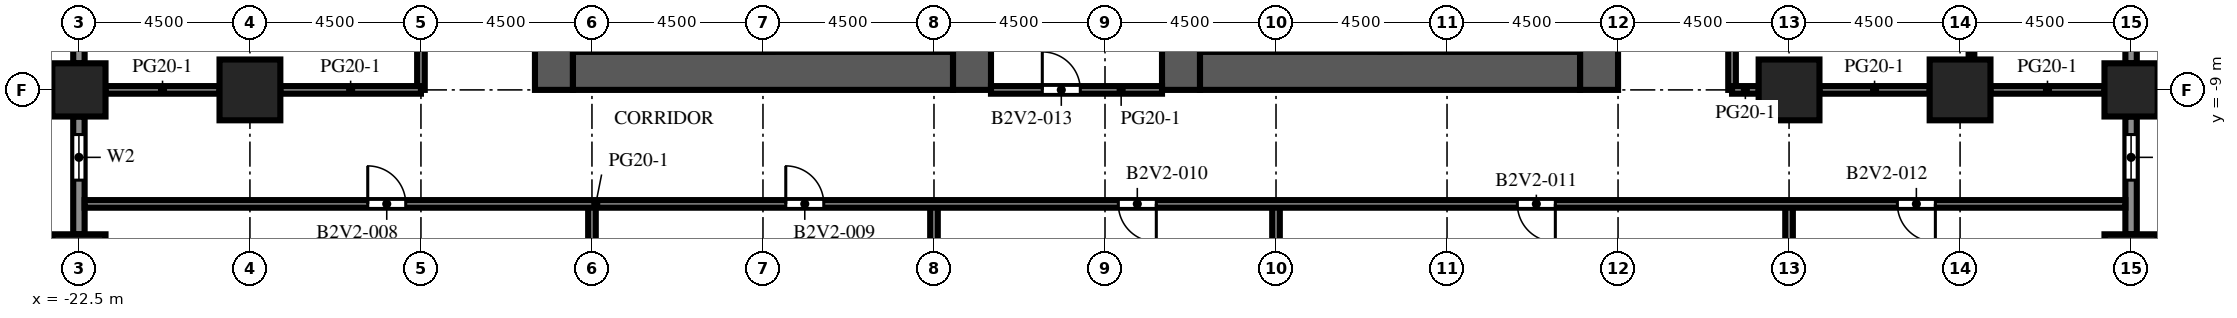
"""IFC4 building model, lengths in metres.
Left out: names, types, materials, properties, quantities, classifications, styles, units other than length and angle.
Written with IfcOpenShell. Run it as: python <this file> out.ifc"""

import sys

from ifc_helpers import new_model, si_unit, direction, frame, frame_2d, origin, origin_2d, place, context, subcontext, project, spatial, rectangle, extrude, element, fill, save


model = new_model("IFC4")
c1 = context("Model", 3, precision=1e-05, world=origin(), true_north=direction((0.0, 1.0)))
c2 = subcontext(c1, "Body", "Model", "MODEL_VIEW")
j1 = project(units=[si_unit("LENGTHUNIT", "METRE"), si_unit("PLANEANGLEUNIT", "RADIAN")], contexts=[c1])
p1 = place(None, origin())
s1 = spatial("IfcSite", under=j1, at=p1, CompositionType="ELEMENT")
p2 = place(p1, origin())
s2 = spatial("IfcBuilding", under=s1, at=p2, CompositionType="ELEMENT")
p3 = place(p2, frame((0.0, 0.0, 58.3)))
s3 = spatial("IfcBuildingStorey", under=s2, at=p3, CompositionType="ELEMENT", Elevation=58.3)
for number, where, z_axis, x_axis in (
    (1, (-22.5, -13.5, 0.0), (0.0, 0.0, 1.0), (1.0, 0.0, 0.0)),
    (2, (-22.5, -9.0, 0.0), (0.0, 0.0, 1.0), (1.0, 0.0, 0.0)),
    (3, (31.5, -13.5, 0.0), (0.0, 0.0, 1.0), (1.0, 0.0, 0.0)),
    (4, (31.5, -9.0, 0.0), (0.0, 0.0, 1.0), (1.0, 0.0, 0.0)),
):
    element("IfcColumn", number, at=place(p3, frame(where, z_axis=z_axis, x_axis=x_axis)), inside=s3, PredefinedType="COLUMN", context=c2, shape_type="SweptSolid", body=[
        extrude(rectangle(XDim=1.4, YDim=1.4, at=origin_2d()), origin(), (0.0, 0.0, 1.0), 4.1),
    ])
for number, where, z_axis, x_axis in (
    (5, (-18.0, -9.0, 0.0), (0.0, 0.0, 1.0), (1.0, 0.0, 0.0)),
    (6, (22.5, -9.0, 0.0), (0.0, 0.0, 1.0), (1.0, 0.0, 0.0)),
    (7, (27.0, -9.0, 0.0), (0.0, 0.0, 1.0), (1.0, 0.0, 0.0)),
):
    element("IfcColumn", number, at=place(p3, frame(where, z_axis=z_axis, x_axis=x_axis)), inside=s3, PredefinedType="COLUMN", context=c2, shape_type="SweptSolid", body=[
        extrude(rectangle(XDim=1.6, YDim=1.6, at=origin_2d()), origin(), (0.0, 0.0, 1.0), 4.1),
    ])
p4 = place(p3, frame((-10.0, -9.0, 0.0), z_axis=(0.0, 0.0, 1.0), x_axis=(0.0, 1.0, 0.0)))
e8 = element("IfcWall", 8, at=p4, inside=s3, PredefinedType="SHEAR", context=c2, shape_type="SweptSolid", body=[
    extrude(rectangle(XDim=27.5, YDim=1.0, at=frame_2d((13.75, 0.0))), origin(), (0.0, 0.0, 1.0), 4.1),
])
p5 = place(p4, frame((12.55, 0.0, 0.0)))
e9 = element("IfcOpeningElement", 9, at=p5, cuts=e8, PredefinedType="OPENING", context=c2, shape_type="SweptSolid", body=[
    extrude(rectangle(XDim=2.4, YDim=2.4, at=frame_2d((1.2, 1.2))), frame((0.0, 0.51, 0.0), z_axis=(0.0, -1.0, 0.0), x_axis=(1.0, 0.0, 0.0)), (0.0, 0.0, 1.0), 1.02),
])
p6 = place(p4, frame((6.825, 0.0, 0.0)))
e10 = element("IfcOpeningElement", 10, at=p6, cuts=e8, PredefinedType="OPENING", context=c2, shape_type="SweptSolid", body=[
    extrude(rectangle(XDim=1.2, YDim=2.1, at=frame_2d((0.6, 1.05))), frame((0.0, 0.51, 0.0), z_axis=(0.0, -1.0, 0.0), x_axis=(1.0, 0.0, 0.0)), (0.0, 0.0, 1.0), 1.02),
])
p7 = place(p4, frame((19.475, 0.0, 0.0)))
e11 = element("IfcOpeningElement", 11, at=p7, cuts=e8, PredefinedType="OPENING", context=c2, shape_type="SweptSolid", body=[
    extrude(rectangle(XDim=1.2, YDim=2.1, at=frame_2d((0.6, 1.05))), frame((0.0, 0.51, 0.0), z_axis=(0.0, -1.0, 0.0), x_axis=(1.0, 0.0, 0.0)), (0.0, 0.0, 1.0), 1.02),
])
p8 = place(p3, frame((1.0, -9.0, 0.0), z_axis=(0.0, 0.0, 1.0), x_axis=(0.0, 1.0, 0.0)))
e12 = element("IfcWall", 12, at=p8, inside=s3, PredefinedType="SHEAR", context=c2, shape_type="SweptSolid", body=[
    extrude(rectangle(XDim=27.5, YDim=1.0, at=frame_2d((13.75, 0.0))), origin(), (0.0, 0.0, 1.0), 4.1),
])
p9 = place(p8, frame((12.55, 0.0, 0.0)))
e13 = element("IfcOpeningElement", 13, at=p9, cuts=e12, PredefinedType="OPENING", context=c2, shape_type="SweptSolid", body=[
    extrude(rectangle(XDim=2.4, YDim=2.4, at=frame_2d((1.2, 1.2))), frame((0.0, 0.51, 0.0), z_axis=(0.0, -1.0, 0.0), x_axis=(1.0, 0.0, 0.0)), (0.0, 0.0, 1.0), 1.02),
])
p10 = place(p8, frame((5.55, 0.0, 0.0)))
e14 = element("IfcOpeningElement", 14, at=p10, cuts=e12, PredefinedType="OPENING", context=c2, shape_type="SweptSolid", body=[
    extrude(rectangle(XDim=0.905, YDim=2.1, at=frame_2d((0.453, 1.05))), frame((0.0, 0.51, 0.0), z_axis=(0.0, -1.0, 0.0), x_axis=(1.0, 0.0, 0.0)), (0.0, 0.0, 1.0), 1.02),
])
p11 = place(p8, frame((23.363, 0.0, 0.0)))
e15 = element("IfcOpeningElement", 15, at=p11, cuts=e12, PredefinedType="OPENING", context=c2, shape_type="SweptSolid", body=[
    extrude(rectangle(XDim=1.2, YDim=2.1, at=frame_2d((0.6, 1.05))), frame((0.0, 0.51, 0.0), z_axis=(0.0, -1.0, 0.0), x_axis=(1.0, 0.0, 0.0)), (0.0, 0.0, 1.0), 1.02),
])
p12 = place(p3, frame((-9.5, -8.5, 0.0), z_axis=(0.0, 0.0, 1.0), x_axis=(1.0, 0.0, 0.0)))
e16 = element("IfcWall", 16, at=p12, inside=s3, PredefinedType="SHEAR", context=c2, shape_type="SweptSolid", body=[
    extrude(rectangle(XDim=10.0, YDim=1.0, at=frame_2d((5.0, 0.0))), origin(), (0.0, 0.0, 1.0), 4.1),
])
p13 = place(p3, frame((6.5, -9.0, 0.0), z_axis=(0.0, 0.0, 1.0), x_axis=(0.0, 1.0, 0.0)))
e17 = element("IfcWall", 17, at=p13, inside=s3, PredefinedType="SHEAR", context=c2, shape_type="SweptSolid", body=[
    extrude(rectangle(XDim=27.5, YDim=1.0, at=frame_2d((13.75, 0.0))), origin(), (0.0, 0.0, 1.0), 4.1),
])
p14 = place(p13, frame((12.55, 0.0, 0.0)))
e18 = element("IfcOpeningElement", 18, at=p14, cuts=e17, PredefinedType="OPENING", context=c2, shape_type="SweptSolid", body=[
    extrude(rectangle(XDim=2.4, YDim=2.4, at=frame_2d((1.2, 1.2))), frame((0.0, 0.51, 0.0), z_axis=(0.0, -1.0, 0.0), x_axis=(1.0, 0.0, 0.0)), (0.0, 0.0, 1.0), 1.02),
])
p15 = place(p13, frame((5.55, 0.0, 0.0)))
e19 = element("IfcOpeningElement", 19, at=p15, cuts=e17, PredefinedType="OPENING", context=c2, shape_type="SweptSolid", body=[
    extrude(rectangle(XDim=0.905, YDim=2.1, at=frame_2d((0.453, 1.05))), frame((0.0, 0.51, 0.0), z_axis=(0.0, -1.0, 0.0), x_axis=(1.0, 0.0, 0.0)), (0.0, 0.0, 1.0), 1.02),
])
p16 = place(p13, frame((23.363, 0.0, 0.0)))
e20 = element("IfcOpeningElement", 20, at=p16, cuts=e17, PredefinedType="OPENING", context=c2, shape_type="SweptSolid", body=[
    extrude(rectangle(XDim=1.2, YDim=2.1, at=frame_2d((0.6, 1.05))), frame((0.0, 0.51, 0.0), z_axis=(0.0, -1.0, 0.0), x_axis=(1.0, 0.0, 0.0)), (0.0, 0.0, 1.0), 1.02),
])
p17 = place(p3, frame((17.5, -9.0, 0.0), z_axis=(0.0, 0.0, 1.0), x_axis=(0.0, 1.0, 0.0)))
e21 = element("IfcWall", 21, at=p17, inside=s3, PredefinedType="SHEAR", context=c2, shape_type="SweptSolid", body=[
    extrude(rectangle(XDim=27.5, YDim=1.0, at=frame_2d((13.75, 0.0))), origin(), (0.0, 0.0, 1.0), 4.1),
])
p18 = place(p17, frame((12.55, 0.0, 0.0)))
e22 = element("IfcOpeningElement", 22, at=p18, cuts=e21, PredefinedType="OPENING", context=c2, shape_type="SweptSolid", body=[
    extrude(rectangle(XDim=2.4, YDim=2.4, at=frame_2d((1.2, 1.2))), frame((0.0, 0.51, 0.0), z_axis=(0.0, -1.0, 0.0), x_axis=(1.0, 0.0, 0.0)), (0.0, 0.0, 1.0), 1.02),
])
p19 = place(p17, frame((6.825, 0.0, 0.0)))
e23 = element("IfcOpeningElement", 23, at=p19, cuts=e21, PredefinedType="OPENING", context=c2, shape_type="SweptSolid", body=[
    extrude(rectangle(XDim=1.2, YDim=2.1, at=frame_2d((0.6, 1.05))), frame((0.0, 0.51, 0.0), z_axis=(0.0, -1.0, 0.0), x_axis=(1.0, 0.0, 0.0)), (0.0, 0.0, 1.0), 1.02),
])
p20 = place(p17, frame((19.475, 0.0, 0.0)))
e24 = element("IfcOpeningElement", 24, at=p20, cuts=e21, PredefinedType="OPENING", context=c2, shape_type="SweptSolid", body=[
    extrude(rectangle(XDim=1.2, YDim=2.1, at=frame_2d((0.6, 1.05))), frame((0.0, 0.51, 0.0), z_axis=(0.0, -1.0, 0.0), x_axis=(1.0, 0.0, 0.0)), (0.0, 0.0, 1.0), 1.02),
])
p21 = place(p3, frame((7.0, -8.5, 0.0), z_axis=(0.0, 0.0, 1.0), x_axis=(1.0, 0.0, 0.0)))
e25 = element("IfcWall", 25, at=p21, inside=s3, PredefinedType="SHEAR", context=c2, shape_type="SweptSolid", body=[
    extrude(rectangle(XDim=10.0, YDim=1.0, at=frame_2d((5.0, 0.0))), origin(), (0.0, 0.0, 1.0), 4.1),
])
p22 = place(p3, frame((31.5, -9.7, 0.0), z_axis=(0.0, 0.0, 1.0), x_axis=(0.0, -1.0, 0.0)))
e26 = element("IfcWall", 26, at=p22, inside=s3, PredefinedType="SOLIDWALL", context=c2, shape_type="SweptSolid", body=[
    extrude(rectangle(XDim=3.1, YDim=0.3, at=frame_2d((1.55, 0.0))), origin(), (0.0, 0.0, 1.0), 2.75),
])
p23 = place(p22, frame((0.475, 0.0, 0.8)))
e27 = element("IfcOpeningElement", 27, at=p23, cuts=e26, PredefinedType="OPENING", context=c2, shape_type="SweptSolid", body=[
    extrude(rectangle(XDim=1.2, YDim=1.7, at=frame_2d((0.6, 0.85))), frame((0.0, 0.16, 0.0), z_axis=(0.0, -1.0, 0.0), x_axis=(1.0, 0.0, 0.0)), (0.0, 0.0, 1.0), 0.32),
])
p24 = place(p3, frame((31.5, -5.2, 0.0), z_axis=(0.0, 0.0, 1.0), x_axis=(0.0, -1.0, 0.0)))
e28 = element("IfcWall", 28, at=p24, inside=s3, PredefinedType="SOLIDWALL", context=c2, shape_type="SweptSolid", body=[
    extrude(rectangle(XDim=3.1, YDim=0.3, at=frame_2d((1.55, 0.0))), origin(), (0.0, 0.0, 1.0), 2.75),
])
p25 = place(p24, frame((0.35, 0.0, 0.8)))
e29 = element("IfcOpeningElement", 29, at=p25, cuts=e28, PredefinedType="OPENING", context=c2, shape_type="SweptSolid", body=[
    extrude(rectangle(XDim=2.4, YDim=1.7, at=frame_2d((1.2, 0.85))), frame((0.0, 0.16, 0.0), z_axis=(0.0, -1.0, 0.0), x_axis=(1.0, 0.0, 0.0)), (0.0, 0.0, 1.0), 0.32),
])
p26 = place(p3, frame((-22.5, -8.3, 0.0), z_axis=(0.0, 0.0, 1.0), x_axis=(0.0, 1.0, 0.0)))
e30 = element("IfcWall", 30, at=p26, inside=s3, PredefinedType="SOLIDWALL", context=c2, shape_type="SweptSolid", body=[
    extrude(rectangle(XDim=3.1, YDim=0.3, at=frame_2d((1.55, 0.0))), origin(), (0.0, 0.0, 1.0), 2.75),
])
p27 = place(p26, frame((0.35, 0.0, 0.8)))
e31 = element("IfcOpeningElement", 31, at=p27, cuts=e30, PredefinedType="OPENING", context=c2, shape_type="SweptSolid", body=[
    extrude(rectangle(XDim=2.4, YDim=1.7, at=frame_2d((1.2, 0.85))), frame((0.0, 0.16, 0.0), z_axis=(0.0, -1.0, 0.0), x_axis=(1.0, 0.0, 0.0)), (0.0, 0.0, 1.0), 0.32),
])
p28 = place(p3, frame((-22.5, -12.8, 0.0), z_axis=(0.0, 0.0, 1.0), x_axis=(0.0, 1.0, 0.0)))
e32 = element("IfcWall", 32, at=p28, inside=s3, PredefinedType="SOLIDWALL", context=c2, shape_type="SweptSolid", body=[
    extrude(rectangle(XDim=3.1, YDim=0.3, at=frame_2d((1.55, 0.0))), origin(), (0.0, 0.0, 1.0), 2.75),
])
p29 = place(p28, frame((1.425, 0.0, 0.8)))
e33 = element("IfcOpeningElement", 33, at=p29, cuts=e32, PredefinedType="OPENING", context=c2, shape_type="SweptSolid", body=[
    extrude(rectangle(XDim=1.2, YDim=1.7, at=frame_2d((0.6, 0.85))), frame((0.0, 0.16, 0.0), z_axis=(0.0, -1.0, 0.0), x_axis=(1.0, 0.0, 0.0)), (0.0, 0.0, 1.0), 0.32),
])
p30 = place(p3, frame((-13.5, -9.0, 0.0), z_axis=(0.0, 0.0, 1.0), x_axis=(0.0, 1.0, 0.0)))
e34 = element("IfcWall", 34, at=p30, inside=s3, PredefinedType="PARTITIONING", context=c2, shape_type="SweptSolid", body=[
    extrude(rectangle(XDim=27.5, YDim=0.2, at=frame_2d((13.75, 0.0))), origin(), (0.0, 0.0, 1.0), 3.65),
])
p31 = place(p30, frame((4.85, 0.0, 0.0)))
e35 = element("IfcOpeningElement", 35, at=p31, cuts=e34, PredefinedType="OPENING", context=c2, shape_type="SweptSolid", body=[
    extrude(rectangle(XDim=1.0, YDim=2.1, at=frame_2d((0.5, 1.05))), frame((0.0, 0.11, 0.0), z_axis=(0.0, -1.0, 0.0), x_axis=(1.0, 0.0, 0.0)), (0.0, 0.0, 1.0), 0.22),
])
p32 = place(p30, frame((16.35, 0.0, 0.0)))
e36 = element("IfcOpeningElement", 36, at=p32, cuts=e34, PredefinedType="OPENING", context=c2, shape_type="SweptSolid", body=[
    extrude(rectangle(XDim=1.0, YDim=2.1, at=frame_2d((0.5, 1.05))), frame((0.0, 0.11, 0.0), z_axis=(0.0, -1.0, 0.0), x_axis=(1.0, 0.0, 0.0)), (0.0, 0.0, 1.0), 0.22),
])
for number, where, z_axis, x_axis in (
    (37, (-9.0, -17.2, 0.0), (0.0, 0.0, 1.0), (0.0, 1.0, 0.0)),
    (38, (0.0, -17.2, 0.0), (0.0, 0.0, 1.0), (0.0, 1.0, 0.0)),
    (39, (9.0, -17.2, 0.0), (0.0, 0.0, 1.0), (0.0, 1.0, 0.0)),
):
    element("IfcWall", number, at=place(p3, frame(where, z_axis=z_axis, x_axis=x_axis)), inside=s3, PredefinedType="PARTITIONING", context=c2, shape_type="SweptSolid", body=[
        extrude(rectangle(XDim=5.2, YDim=0.2, at=frame_2d((2.6, 0.0))), origin(), (0.0, 0.0, 1.0), 3.65),
    ])
p33 = place(p3, frame((21.0, 18.5, 0.0), z_axis=(0.0, 0.0, 1.0), x_axis=(0.0, -1.0, 0.0)))
e40 = element("IfcWall", 40, at=p33, inside=s3, PredefinedType="PARTITIONING", context=c2, shape_type="SweptSolid", body=[
    extrude(rectangle(XDim=27.5, YDim=0.2, at=frame_2d((13.75, 0.0))), origin(), (0.0, 0.0, 1.0), 3.65),
])
p34 = place(p33, frame((19.4, 0.0, 0.0)))
e41 = element("IfcOpeningElement", 41, at=p34, cuts=e40, PredefinedType="OPENING", context=c2, shape_type="SweptSolid", body=[
    extrude(rectangle(XDim=1.0, YDim=2.1, at=frame_2d((0.5, 1.05))), frame((0.0, 0.11, 0.0), z_axis=(0.0, -1.0, 0.0), x_axis=(1.0, 0.0, 0.0)), (0.0, 0.0, 1.0), 0.22),
])
p35 = place(p33, frame((7.65, 0.0, 0.0)))
e42 = element("IfcOpeningElement", 42, at=p35, cuts=e40, PredefinedType="OPENING", context=c2, shape_type="SweptSolid", body=[
    extrude(rectangle(XDim=1.0, YDim=2.1, at=frame_2d((0.5, 1.05))), frame((0.0, 0.11, 0.0), z_axis=(0.0, -1.0, 0.0), x_axis=(1.0, 0.0, 0.0)), (0.0, 0.0, 1.0), 0.22),
])
p36 = place(p3, frame((22.5, -17.2, 0.0), z_axis=(0.0, 0.0, 1.0), x_axis=(0.0, 1.0, 0.0)))
e43 = element("IfcWall", 43, at=p36, inside=s3, PredefinedType="PARTITIONING", context=c2, shape_type="SweptSolid", body=[
    extrude(rectangle(XDim=5.2, YDim=0.2, at=frame_2d((2.6, 0.0))), origin(), (0.0, 0.0, 1.0), 3.65),
])
p37 = place(p3, frame((27.3, -0.8, 0.0), z_axis=(0.0, 0.0, 1.0), x_axis=(0.0, -1.0, 0.0)))
e44 = element("IfcWall", 44, at=p37, inside=s3, PredefinedType="PARTITIONING", context=c2, shape_type="SweptSolid", body=[
    extrude(rectangle(XDim=7.4, YDim=0.15, at=frame_2d((3.7, 0.0))), origin(), (0.0, 0.0, 1.0), 3.65),
])
p38 = place(p37, frame((0.1, 0.0, 0.0)))
e45 = element("IfcOpeningElement", 45, at=p38, cuts=e44, PredefinedType="OPENING", context=c2, shape_type="SweptSolid", body=[
    extrude(rectangle(XDim=1.0, YDim=2.1, at=frame_2d((0.5, 1.05))), frame((0.0, 0.085, 0.0), z_axis=(0.0, -1.0, 0.0), x_axis=(1.0, 0.0, 0.0)), (0.0, 0.0, 1.0), 0.17),
])
p39 = place(p3, frame((31.35, -12.0, 0.0), z_axis=(0.0, 0.0, 1.0), x_axis=(-1.0, 0.0, 0.0)))
e46 = element("IfcWall", 46, at=p39, inside=s3, PredefinedType="PARTITIONING", context=c2, shape_type="SweptSolid", body=[
    extrude(rectangle(XDim=53.7, YDim=0.2, at=frame_2d((26.85, 0.0))), origin(), (0.0, 0.0, 1.0), 3.65),
])
p40 = place(p39, frame((45.25, 0.0, 0.0)))
e47 = element("IfcOpeningElement", 47, at=p40, cuts=e46, PredefinedType="OPENING", context=c2, shape_type="SweptSolid", body=[
    extrude(rectangle(XDim=1.0, YDim=2.1, at=frame_2d((0.5, 1.05))), frame((0.0, 0.11, 0.0), z_axis=(0.0, -1.0, 0.0), x_axis=(1.0, 0.0, 0.0)), (0.0, 0.0, 1.0), 0.22),
])
p41 = place(p39, frame((34.25, 0.0, 0.0)))
e48 = element("IfcOpeningElement", 48, at=p41, cuts=e46, PredefinedType="OPENING", context=c2, shape_type="SweptSolid", body=[
    extrude(rectangle(XDim=1.0, YDim=2.1, at=frame_2d((0.5, 1.05))), frame((0.0, 0.11, 0.0), z_axis=(0.0, -1.0, 0.0), x_axis=(1.0, 0.0, 0.0)), (0.0, 0.0, 1.0), 0.22),
])
p42 = place(p39, frame((25.5, 0.0, 0.0)))
e49 = element("IfcOpeningElement", 49, at=p42, cuts=e46, PredefinedType="OPENING", context=c2, shape_type="SweptSolid", body=[
    extrude(rectangle(XDim=1.0, YDim=2.1, at=frame_2d((0.5, 1.05))), frame((0.0, 0.11, 0.0), z_axis=(0.0, -1.0, 0.0), x_axis=(1.0, 0.0, 0.0)), (0.0, 0.0, 1.0), 0.22),
])
p43 = place(p39, frame((15.0, 0.0, 0.0)))
e50 = element("IfcOpeningElement", 50, at=p43, cuts=e46, PredefinedType="OPENING", context=c2, shape_type="SweptSolid", body=[
    extrude(rectangle(XDim=1.0, YDim=2.1, at=frame_2d((0.5, 1.05))), frame((0.0, 0.11, 0.0), z_axis=(0.0, -1.0, 0.0), x_axis=(1.0, 0.0, 0.0)), (0.0, 0.0, 1.0), 0.22),
])
p44 = place(p39, frame((5.0, 0.0, 0.0)))
e51 = element("IfcOpeningElement", 51, at=p44, cuts=e46, PredefinedType="OPENING", context=c2, shape_type="SweptSolid", body=[
    extrude(rectangle(XDim=1.0, YDim=2.1, at=frame_2d((0.5, 1.05))), frame((0.0, 0.11, 0.0), z_axis=(0.0, -1.0, 0.0), x_axis=(1.0, 0.0, 0.0)), (0.0, 0.0, 1.0), 0.22),
])
p45 = place(p3, frame((-21.8, -9.0, 0.0), z_axis=(0.0, 0.0, 1.0), x_axis=(1.0, 0.0, 0.0)))
e52 = element("IfcWall", 52, at=p45, inside=s3, PredefinedType="PARTITIONING", context=c2, shape_type="SweptSolid", body=[
    extrude(rectangle(XDim=3.0, YDim=0.2, at=frame_2d((1.5, 0.0))), origin(), (0.0, 0.0, 1.0), 3.65),
])
p46 = place(p3, frame((-17.2, -9.0, 0.0), z_axis=(0.0, 0.0, 1.0), x_axis=(1.0, 0.0, 0.0)))
e53 = element("IfcWall", 53, at=p46, inside=s3, PredefinedType="PARTITIONING", context=c2, shape_type="SweptSolid", body=[
    extrude(rectangle(XDim=3.7, YDim=0.2, at=frame_2d((1.85, 0.0))), origin(), (0.0, 0.0, 1.0), 3.65),
])
p47 = place(p3, frame((1.5, -9.0, 0.0), z_axis=(0.0, 0.0, 1.0), x_axis=(1.0, 0.0, 0.0)))
e54 = element("IfcWall", 54, at=p47, inside=s3, PredefinedType="PARTITIONING", context=c2, shape_type="SweptSolid", body=[
    extrude(rectangle(XDim=4.5, YDim=0.2, at=frame_2d((2.25, 0.0))), origin(), (0.0, 0.0, 1.0), 3.65),
])
p48 = place(p47, frame((1.35, 0.0, 0.0)))
e55 = element("IfcOpeningElement", 55, at=p48, cuts=e54, PredefinedType="OPENING", context=c2, shape_type="SweptSolid", body=[
    extrude(rectangle(XDim=1.0, YDim=2.1, at=frame_2d((0.5, 1.05))), frame((0.0, 0.11, 0.0), z_axis=(0.0, -1.0, 0.0), x_axis=(1.0, 0.0, 0.0)), (0.0, 0.0, 1.0), 0.22),
])
p49 = place(p3, frame((21.0, -9.0, 0.0), z_axis=(0.0, 0.0, 1.0), x_axis=(1.0, 0.0, 0.0)))
e56 = element("IfcWall", 56, at=p49, inside=s3, PredefinedType="PARTITIONING", context=c2, shape_type="SweptSolid", body=[
    extrude(rectangle(XDim=0.7, YDim=0.2, at=frame_2d((0.35, 0.0))), origin(), (0.0, 0.0, 1.0), 3.65),
])
p50 = place(p3, frame((23.3, -9.0, 0.0), z_axis=(0.0, 0.0, 1.0), x_axis=(1.0, 0.0, 0.0)))
e57 = element("IfcWall", 57, at=p50, inside=s3, PredefinedType="PARTITIONING", context=c2, shape_type="SweptSolid", body=[
    extrude(rectangle(XDim=2.9, YDim=0.2, at=frame_2d((1.45, 0.0))), origin(), (0.0, 0.0, 1.0), 3.65),
])
p51 = place(p3, frame((27.8, -9.0, 0.0), z_axis=(0.0, 0.0, 1.0), x_axis=(1.0, 0.0, 0.0)))
e58 = element("IfcWall", 58, at=p51, inside=s3, PredefinedType="PARTITIONING", context=c2, shape_type="SweptSolid", body=[
    extrude(rectangle(XDim=3.0, YDim=0.2, at=frame_2d((1.5, 0.0))), origin(), (0.0, 0.0, 1.0), 3.65),
])
p52 = place(p23, origin())
e59 = element("IfcWindow", 59, at=p52, inside=s3, PartitioningType="SINGLE_PANEL", PredefinedType="WINDOW", context=c2, shape_type="SweptSolid", body=[
    extrude(rectangle(XDim=1.2, YDim=1.7, at=frame_2d((0.6, 0.85))), frame((0.0, 0.03, 0.0), z_axis=(0.0, -1.0, 0.0), x_axis=(1.0, 0.0, 0.0)), (0.0, 0.0, 1.0), 0.06),
])
fill(e27, e59)
p53 = place(p29, origin())
e60 = element("IfcWindow", 60, at=p53, inside=s3, PartitioningType="SINGLE_PANEL", PredefinedType="WINDOW", context=c2, shape_type="SweptSolid", body=[
    extrude(rectangle(XDim=1.2, YDim=1.7, at=frame_2d((0.6, 0.85))), frame((0.0, 0.03, 0.0), z_axis=(0.0, -1.0, 0.0), x_axis=(1.0, 0.0, 0.0)), (0.0, 0.0, 1.0), 0.06),
])
fill(e33, e60)
p54 = place(p40, origin())
e61 = element("IfcDoor", 61, at=p54, inside=s3, OperationType="SINGLE_SWING_RIGHT", PredefinedType="DOOR", context=c2, shape_type="SweptSolid", body=[
    extrude(rectangle(XDim=1.0, YDim=2.1, at=frame_2d((0.5, 1.05))), frame((0.0, 0.025, 0.0), z_axis=(0.0, -1.0, 0.0), x_axis=(1.0, 0.0, 0.0)), (0.0, 0.0, 1.0), 0.05),
])
fill(e47, e61)
p55 = place(p41, origin())
e62 = element("IfcDoor", 62, at=p55, inside=s3, OperationType="SINGLE_SWING_RIGHT", PredefinedType="DOOR", context=c2, shape_type="SweptSolid", body=[
    extrude(rectangle(XDim=1.0, YDim=2.1, at=frame_2d((0.5, 1.05))), frame((0.0, 0.025, 0.0), z_axis=(0.0, -1.0, 0.0), x_axis=(1.0, 0.0, 0.0)), (0.0, 0.0, 1.0), 0.05),
])
fill(e48, e62)
p56 = place(p42, origin())
e63 = element("IfcDoor", 63, at=p56, inside=s3, OperationType="SINGLE_SWING_LEFT", PredefinedType="DOOR", context=c2, shape_type="SweptSolid", body=[
    extrude(rectangle(XDim=1.0, YDim=2.1, at=frame_2d((0.5, 1.05))), frame((0.0, 0.025, 0.0), z_axis=(0.0, -1.0, 0.0), x_axis=(1.0, 0.0, 0.0)), (0.0, 0.0, 1.0), 0.05),
])
fill(e49, e63)
p57 = place(p43, origin())
e64 = element("IfcDoor", 64, at=p57, inside=s3, OperationType="SINGLE_SWING_LEFT", PredefinedType="DOOR", context=c2, shape_type="SweptSolid", body=[
    extrude(rectangle(XDim=1.0, YDim=2.1, at=frame_2d((0.5, 1.05))), frame((0.0, 0.025, 0.0), z_axis=(0.0, -1.0, 0.0), x_axis=(1.0, 0.0, 0.0)), (0.0, 0.0, 1.0), 0.05),
])
fill(e50, e64)
p58 = place(p44, origin())
e65 = element("IfcDoor", 65, at=p58, inside=s3, OperationType="SINGLE_SWING_LEFT", PredefinedType="DOOR", context=c2, shape_type="SweptSolid", body=[
    extrude(rectangle(XDim=1.0, YDim=2.1, at=frame_2d((0.5, 1.05))), frame((0.0, 0.025, 0.0), z_axis=(0.0, -1.0, 0.0), x_axis=(1.0, 0.0, 0.0)), (0.0, 0.0, 1.0), 0.05),
])
fill(e51, e65)
p59 = place(p48, origin())
e66 = element("IfcDoor", 66, at=p59, inside=s3, OperationType="SINGLE_SWING_LEFT", PredefinedType="DOOR", context=c2, shape_type="SweptSolid", body=[
    extrude(rectangle(XDim=1.0, YDim=2.1, at=frame_2d((0.5, 1.05))), frame((0.0, 0.025, 0.0), z_axis=(0.0, -1.0, 0.0), x_axis=(1.0, 0.0, 0.0)), (0.0, 0.0, 1.0), 0.05),
])
fill(e55, e66)
save(model, sys.argv[1])
